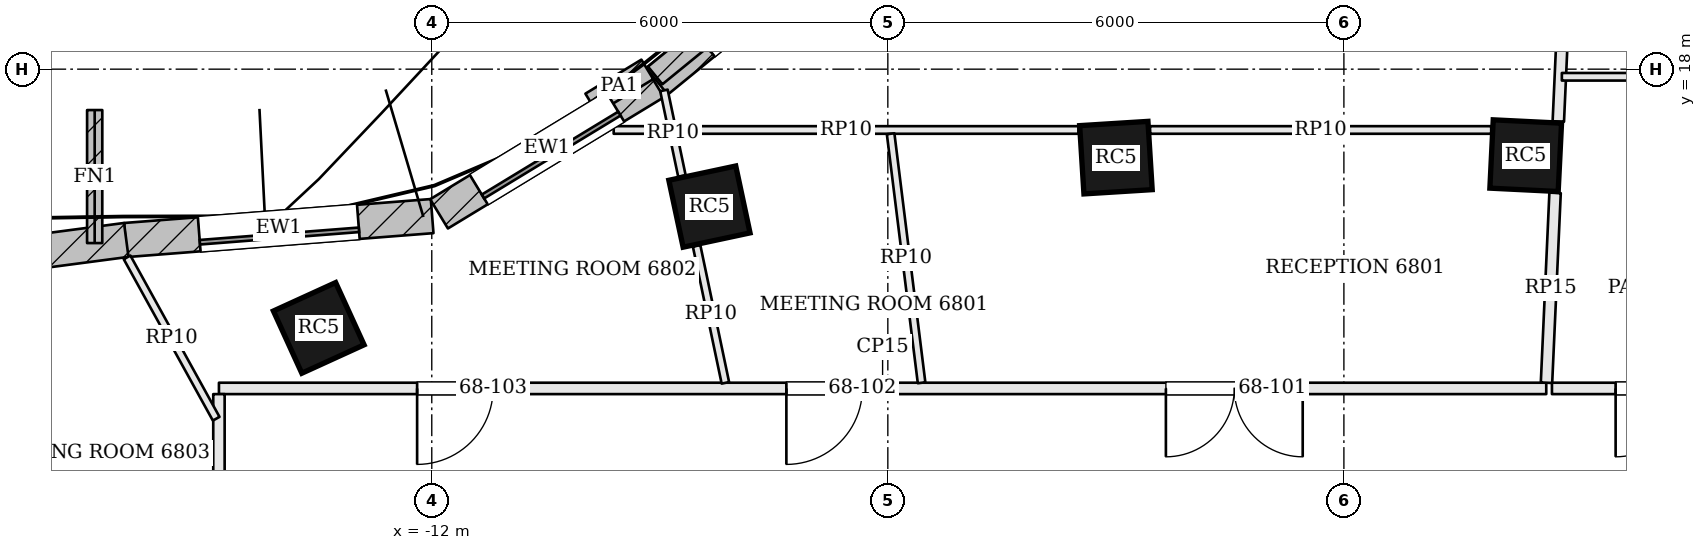
"""IFC4 building model, lengths in metres.
Left out: names, types, materials, properties, quantities, classifications, styles, units other than length and angle.
Written with IfcOpenShell. Run it as: python <this file> out.ifc"""

import sys

from ifc_helpers import new_model, si_unit, direction, frame, frame_2d, origin, origin_2d, place, context, subcontext, project, spatial, rectangle, extrude, element, fill, save


model = new_model("IFC4")
c1 = context("Model", 3, precision=1e-05, world=origin(), true_north=direction((0.0, 1.0)))
c2 = subcontext(c1, "Body", "Model", "MODEL_VIEW")
j1 = project(units=[si_unit("LENGTHUNIT", "METRE"), si_unit("PLANEANGLEUNIT", "RADIAN")], contexts=[c1])
p1 = place(None, origin())
s1 = spatial("IfcSite", under=j1, at=p1, CompositionType="ELEMENT")
p2 = place(p1, origin())
s2 = spatial("IfcBuilding", under=s1, at=p2, CompositionType="ELEMENT")
p3 = place(p2, frame((0.0, 0.0, 276.6)))
s3 = spatial("IfcBuildingStorey", under=s2, at=p3, CompositionType="ELEMENT", Elevation=276.6)
for number, where, z_axis, x_axis in (
    (1, (2.392, 16.862, 0.0), (0.0, 0.0, 1.0), (-0.999, 0.049, 0.0)),
    (2, (-2.999, 16.836, 0.0), (0.0, 0.0, 1.0), (-0.998, -0.062, 0.0)),
    (3, (-8.347, 16.192, 0.0), (0.0, 0.0, 1.0), (-0.978, -0.209, 0.0)),
    (4, (-13.487, 14.596, 0.0), (0.0, 0.0, 1.0), (-0.91, -0.415, 0.0)),
):
    element("IfcColumn", number, at=place(p3, frame(where, z_axis=z_axis, x_axis=x_axis)), inside=s3, PredefinedType="COLUMN", context=c2, shape_type="SweptSolid", body=[
        extrude(rectangle(XDim=0.9, YDim=0.9, at=origin_2d()), origin(), (0.0, 0.0, 1.0), 3.9),
    ])
p4 = place(p3, frame((6.177, 17.798, 0.0), z_axis=(0.0, 0.0, 1.0), x_axis=(-0.852939764965, 0.52200934603, 0.0)))
e5 = element("IfcWall", 5, at=p4, inside=s3, PredefinedType="SOLIDWALL", context=c2, shape_type="SweptSolid", body=[
    extrude(rectangle(XDim=4.113, YDim=0.45, at=frame_2d((2.056, 0.0))), origin(), (0.0, 0.0, 1.0), 3.7),
])
p5 = place(p4, frame((1.006, 0.0, 0.9)))
e6 = element("IfcOpeningElement", 6, at=p5, cuts=e5, PredefinedType="OPENING", context=c2, shape_type="SweptSolid", body=[
    extrude(rectangle(XDim=2.1, YDim=2.3, at=frame_2d((1.05, 1.15))), frame((0.0, 0.235, 0.0), z_axis=(0.0, -1.0, 0.0), x_axis=(1.0, 0.0, 0.0)), (0.0, 0.0, 1.0), 0.47),
])
p6 = place(p3, frame((-6.411, 19.983, 0.0), z_axis=(0.0, 0.0, 1.0), x_axis=(-0.774810240287, -0.632193871804, 0.0)))
e7 = element("IfcWall", 7, at=p6, inside=s3, PredefinedType="SOLIDWALL", context=c2, shape_type="SweptSolid", body=[
    extrude(rectangle(XDim=3.389, YDim=0.45, at=frame_2d((1.695, 0.0))), origin(), (0.0, 0.0, 1.0), 3.7),
])
p7 = place(p6, frame((0.795, 0.0, 0.9)))
e8 = element("IfcOpeningElement", 8, at=p7, cuts=e7, PredefinedType="OPENING", context=c2, shape_type="SweptSolid", body=[
    extrude(rectangle(XDim=1.8, YDim=2.3, at=frame_2d((0.9, 1.15))), frame((0.0, 0.235, 0.0), z_axis=(0.0, -1.0, 0.0), x_axis=(1.0, 0.0, 0.0)), (0.0, 0.0, 1.0), 0.47),
])
p8 = place(p3, frame((-9.063, 17.823, 0.0), z_axis=(0.0, 0.0, 1.0), x_axis=(-0.854622263029, -0.519250216693, 0.0)))
e9 = element("IfcWall", 9, at=p8, inside=s3, PredefinedType="SOLIDWALL", context=c2, shape_type="SweptSolid", body=[
    extrude(rectangle(XDim=3.325, YDim=0.45, at=frame_2d((1.662, 0.0))), origin(), (0.0, 0.0, 1.0), 3.7),
])
p9 = place(p8, frame((0.612, 0.0, 0.9)))
e10 = element("IfcOpeningElement", 10, at=p9, cuts=e9, PredefinedType="OPENING", context=c2, shape_type="SweptSolid", body=[
    extrude(rectangle(XDim=2.1, YDim=2.3, at=frame_2d((1.05, 1.15))), frame((0.0, 0.235, 0.0), z_axis=(0.0, -1.0, 0.0), x_axis=(1.0, 0.0, 0.0)), (0.0, 0.0, 1.0), 0.47),
])
p10 = place(p3, frame((-11.995, 16.067, 0.0), z_axis=(0.0, 0.0, 1.0), x_axis=(-0.996967993416, -0.077812724559, 0.0)))
e11 = element("IfcWall", 11, at=p10, inside=s3, PredefinedType="SOLIDWALL", context=c2, shape_type="SweptSolid", body=[
    extrude(rectangle(XDim=4.047, YDim=0.45, at=frame_2d((2.024, 0.0))), origin(), (0.0, 0.0, 1.0), 3.7),
])
p11 = place(p10, frame((0.974, 0.0, 0.9)))
e12 = element("IfcOpeningElement", 12, at=p11, cuts=e11, PredefinedType="OPENING", context=c2, shape_type="SweptSolid", body=[
    extrude(rectangle(XDim=2.1, YDim=2.3, at=frame_2d((1.05, 1.15))), frame((0.0, 0.235, 0.0), z_axis=(0.0, -1.0, 0.0), x_axis=(1.0, 0.0, 0.0)), (0.0, 0.0, 1.0), 0.47),
])
p12 = place(p3, frame((-16.019, 15.753, 0.0), z_axis=(0.0, 0.0, 1.0), x_axis=(-0.991409967396, -0.130790965086, 0.0)))
e13 = element("IfcWall", 13, at=p12, inside=s3, PredefinedType="SOLIDWALL", context=c2, shape_type="SweptSolid", body=[
    extrude(rectangle(XDim=5.068, YDim=0.45, at=frame_2d((2.534, 0.0))), origin(), (0.0, 0.0, 1.0), 3.7),
])
p13 = place(p12, frame((1.484, 0.0, 0.9)))
e14 = element("IfcOpeningElement", 14, at=p13, cuts=e13, PredefinedType="OPENING", context=c2, shape_type="SweptSolid", body=[
    extrude(rectangle(XDim=2.1, YDim=2.3, at=frame_2d((1.05, 1.15))), frame((0.0, 0.235, 0.0), z_axis=(0.0, -1.0, 0.0), x_axis=(1.0, 0.0, 0.0)), (0.0, 0.0, 1.0), 0.47),
])
p14 = place(p3, frame((-16.435, 15.712, 0.0), z_axis=(0.0, 0.0, 1.0), x_axis=(0.000279017846, 0.999999961075, 0.0)))
e15 = element("IfcWall", 15, at=p14, inside=s3, PredefinedType="SOLIDWALL", context=c2, shape_type="SweptSolid", body=[
    extrude(rectangle(XDim=1.75, YDim=0.2, at=frame_2d((0.875, 0.0))), origin(), (0.0, 0.0, 1.0), 3.7),
])
p15 = place(p3, frame((-6.505, 20.003, 3.9), z_axis=(0.0, 0.0, 1.0), x_axis=(-0.774774389425, -0.632237807705, 0.0)))
e16 = element("IfcWall", 16, at=p15, inside=s3, PredefinedType="PARAPET", context=c2, shape_type="SweptSolid", body=[
    extrude(rectangle(XDim=3.299, YDim=0.3, at=frame_2d((1.649, 0.0))), origin(), (0.0, 0.0, 1.0), 1.1),
])
p16 = place(p3, frame((-9.164, 17.997, 3.9), z_axis=(0.0, 0.0, 1.0), x_axis=(-0.854630396294, -0.519236830098, 0.0)))
e17 = element("IfcWall", 17, at=p16, inside=s3, PredefinedType="PARAPET", context=c2, shape_type="SweptSolid", body=[
    extrude(rectangle(XDim=0.862, YDim=0.3, at=frame_2d((0.431, 0.0))), origin(), (0.0, 0.0, 1.0), 1.1),
])
p17 = place(p3, frame((2.662, 13.8, 0.0), z_axis=(0.0, 0.0, 1.0), x_axis=(-1.0, 0.0, 0.0)))
e18 = element("IfcWall", 18, at=p17, inside=s3, PredefinedType="PARTITIONING", context=c2, shape_type="SweptSolid", body=[
    extrude(rectangle(XDim=17.462, YDim=0.15, at=frame_2d((8.731, 0.0))), origin(), (0.0, 0.0, 1.0), 3.198),
])
p18 = place(p17, frame((3.204, 0.0, 0.0)))
e19 = element("IfcOpeningElement", 19, at=p18, cuts=e18, PredefinedType="OPENING", context=c2, shape_type="SweptSolid", body=[
    extrude(rectangle(XDim=1.8, YDim=2.1, at=frame_2d((0.9, 1.05))), frame((0.0, 0.085, 0.0), z_axis=(0.0, -1.0, 0.0), x_axis=(1.0, 0.0, 0.0)), (0.0, 0.0, 1.0), 0.17),
])
p19 = place(p17, frame((8.997, 0.0, 0.0)))
e20 = element("IfcOpeningElement", 20, at=p19, cuts=e18, PredefinedType="OPENING", context=c2, shape_type="SweptSolid", body=[
    extrude(rectangle(XDim=1.0, YDim=2.4, at=frame_2d((0.5, 1.2))), frame((0.0, 0.085, 0.0), z_axis=(0.0, -1.0, 0.0), x_axis=(1.0, 0.0, 0.0)), (0.0, 0.0, 1.0), 0.17),
])
p20 = place(p17, frame((13.855, 0.0, 0.0)))
e21 = element("IfcOpeningElement", 21, at=p20, cuts=e18, PredefinedType="OPENING", context=c2, shape_type="SweptSolid", body=[
    extrude(rectangle(XDim=1.0, YDim=2.4, at=frame_2d((0.5, 1.2))), frame((0.0, 0.085, 0.0), z_axis=(0.0, -1.0, 0.0), x_axis=(1.0, 0.0, 0.0)), (0.0, 0.0, 1.0), 0.17),
])
p21 = place(p3, frame((-14.8, 13.725, 0.0), z_axis=(0.0, 0.0, 1.0), x_axis=(0.0, -1.0, 0.0)))
e22 = element("IfcWall", 22, at=p21, inside=s3, PredefinedType="PARTITIONING", context=c2, shape_type="SweptSolid", body=[
    extrude(rectangle(XDim=17.5, YDim=0.15, at=frame_2d((8.75, 0.0))), origin(), (0.0, 0.0, 1.0), 3.198),
])
p22 = place(p21, frame((2.536, 0.0, 0.0)))
e23 = element("IfcOpeningElement", 23, at=p22, cuts=e22, PredefinedType="OPENING", context=c2, shape_type="SweptSolid", body=[
    extrude(rectangle(XDim=1.0, YDim=2.4, at=frame_2d((0.5, 1.2))), frame((0.0, 0.085, 0.0), z_axis=(0.0, -1.0, 0.0), x_axis=(1.0, 0.0, 0.0)), (0.0, 0.0, 1.0), 0.17),
])
p23 = place(p21, frame((6.442, 0.0, 0.0)))
e24 = element("IfcOpeningElement", 24, at=p23, cuts=e22, PredefinedType="OPENING", context=c2, shape_type="SweptSolid", body=[
    extrude(rectangle(XDim=1.0, YDim=2.4, at=frame_2d((0.5, 1.2))), frame((0.0, 0.085, 0.0), z_axis=(0.0, -1.0, 0.0), x_axis=(1.0, 0.0, 0.0)), (0.0, 0.0, 1.0), 0.17),
])
p24 = place(p21, frame((10.45, 0.0, 0.0)))
e25 = element("IfcOpeningElement", 25, at=p24, cuts=e22, PredefinedType="OPENING", context=c2, shape_type="SweptSolid", body=[
    extrude(rectangle(XDim=1.0, YDim=2.1, at=frame_2d((0.5, 1.05))), frame((0.0, 0.085, 0.0), z_axis=(0.0, -1.0, 0.0), x_axis=(1.0, 0.0, 0.0)), (0.0, 0.0, 1.0), 0.17),
])
p25 = place(p21, frame((15.05, 0.0, 0.0)))
e26 = element("IfcOpeningElement", 26, at=p25, cuts=e22, PredefinedType="OPENING", context=c2, shape_type="SweptSolid", body=[
    extrude(rectangle(XDim=1.0, YDim=2.1, at=frame_2d((0.5, 1.05))), frame((0.0, 0.085, 0.0), z_axis=(0.0, -1.0, 0.0), x_axis=(1.0, 0.0, 0.0)), (0.0, 0.0, 1.0), 0.17),
])
p26 = place(p3, frame((2.921, 19.522, 0.0), z_axis=(0.0, 0.0, 1.0), x_axis=(-0.045122409645, -0.998981465368, 0.0)))
e27 = element("IfcWall", 27, at=p26, inside=s3, PredefinedType="PARTITIONING", context=c2, shape_type="SweptSolid", body=[
    extrude(rectangle(XDim=2.213, YDim=0.15, at=frame_2d((1.106, 0.0))), origin(), (0.0, 0.0, 1.0), 3.184),
])
p27 = place(p3, frame((2.779, 16.372, 0.0), z_axis=(0.0, 0.0, 1.0), x_axis=(-0.045217170266, -0.998977180677, 0.0)))
e28 = element("IfcWall", 28, at=p27, inside=s3, PredefinedType="PARTITIONING", context=c2, shape_type="SweptSolid", body=[
    extrude(rectangle(XDim=2.5, YDim=0.15, at=frame_2d((1.25, 0.0))), origin(), (0.0, 0.0, 1.0), 3.184),
])
p28 = place(p3, frame((14.725, 13.8, 0.0), z_axis=(0.0, 0.0, 1.0), x_axis=(-1.0, 0.0, 0.0)))
e29 = element("IfcWall", 29, at=p28, inside=s3, PredefinedType="PARTITIONING", context=c2, shape_type="SweptSolid", body=[
    extrude(rectangle(XDim=11.988, YDim=0.15, at=frame_2d((5.994, 0.0))), origin(), (0.0, 0.0, 1.0), 3.198),
])
p29 = place(p28, frame((3.2, 0.0, 0.0)))
e30 = element("IfcOpeningElement", 30, at=p29, cuts=e29, PredefinedType="OPENING", context=c2, shape_type="SweptSolid", body=[
    extrude(rectangle(XDim=1.8, YDim=2.1, at=frame_2d((0.9, 1.05))), frame((0.0, 0.085, 0.0), z_axis=(0.0, -1.0, 0.0), x_axis=(1.0, 0.0, 0.0)), (0.0, 0.0, 1.0), 0.17),
])
p30 = place(p28, frame((5.757, 0.0, 0.0)))
e31 = element("IfcOpeningElement", 31, at=p30, cuts=e29, PredefinedType="OPENING", context=c2, shape_type="SweptSolid", body=[
    extrude(rectangle(XDim=1.0, YDim=2.4, at=frame_2d((0.5, 1.2))), frame((0.0, 0.085, 0.0), z_axis=(0.0, -1.0, 0.0), x_axis=(1.0, 0.0, 0.0)), (0.0, 0.0, 1.0), 0.17),
])
p31 = place(p28, frame((10.25, 0.0, 0.0)))
e32 = element("IfcOpeningElement", 32, at=p31, cuts=e29, PredefinedType="OPENING", context=c2, shape_type="SweptSolid", body=[
    extrude(rectangle(XDim=0.9, YDim=2.1, at=frame_2d((0.45, 1.05))), frame((0.0, 0.085, 0.0), z_axis=(0.0, -1.0, 0.0), x_axis=(1.0, 0.0, 0.0)), (0.0, 0.0, 1.0), 0.17),
])
p32 = place(p3, frame((-9.607, 17.2, 0.0), z_axis=(0.0, 0.0, 1.0), x_axis=(1.0, 0.0, 0.0)))
e33 = element("IfcWall", 33, at=p32, inside=s3, PredefinedType="PARTITIONING", context=c2, shape_type="SweptSolid", body=[
    extrude(rectangle(XDim=6.114, YDim=0.1, at=frame_2d((3.057, 0.0))), origin(), (0.0, 0.0, 1.0), 3.184),
])
p33 = place(p3, frame((-2.551, 17.2, 0.0), z_axis=(0.0, 0.0, 1.0), x_axis=(1.0, 0.0, 0.0)))
e34 = element("IfcWall", 34, at=p33, inside=s3, PredefinedType="PARTITIONING", context=c2, shape_type="SweptSolid", body=[
    extrude(rectangle(XDim=4.489, YDim=0.1, at=frame_2d((2.244, 0.0))), origin(), (0.0, 0.0, 1.0), 3.184),
])
p34 = place(p3, frame((-5.556, 13.875, 0.0), z_axis=(0.0, 0.0, 1.0), x_axis=(-0.123361123782, 0.99236184587, 0.0)))
e35 = element("IfcWall", 35, at=p34, inside=s3, PredefinedType="PARTITIONING", context=c2, shape_type="SweptSolid", body=[
    extrude(rectangle(XDim=3.301, YDim=0.1, at=frame_2d((1.65, 0.0))), origin(), (0.0, 0.0, 1.0), 3.184),
])
p35 = place(p3, frame((-8.137, 13.873, 0.0), z_axis=(0.0, 0.0, 1.0), x_axis=(-0.20551596438, 0.978653763282, 0.0)))
e36 = element("IfcWall", 36, at=p35, inside=s3, PredefinedType="PARTITIONING", context=c2, shape_type="SweptSolid", body=[
    extrude(rectangle(XDim=1.841, YDim=0.1, at=frame_2d((0.921, 0.0))), origin(), (0.0, 0.0, 1.0), 3.184),
])
p36 = place(p3, frame((-8.709, 16.595, 0.0), z_axis=(0.0, 0.0, 1.0), x_axis=(-0.205700213962, 0.978615053009, 0.0)))
e37 = element("IfcWall", 37, at=p36, inside=s3, PredefinedType="PARTITIONING", context=c2, shape_type="SweptSolid", body=[
    extrude(rectangle(XDim=1.15, YDim=0.1, at=frame_2d((0.575, 0.0))), origin(), (0.0, 0.0, 1.0), 3.184),
])
p37 = place(p3, frame((-14.836, 13.401, 0.0), z_axis=(0.0, 0.0, 1.0), x_axis=(-0.483487187132, 0.875351437926, 0.0)))
e38 = element("IfcWall", 38, at=p37, inside=s3, PredefinedType="PARTITIONING", context=c2, shape_type="SweptSolid", body=[
    extrude(rectangle(XDim=2.425, YDim=0.1, at=frame_2d((1.212, 0.0))), origin(), (0.0, 0.0, 1.0), 3.184),
])
p38 = place(p3, frame((2.868, 17.9, 0.0), z_axis=(0.0, 0.0, 1.0), x_axis=(1.0, 0.0, 0.0)))
e39 = element("IfcWall", 39, at=p38, inside=s3, PredefinedType="PARTITIONING", context=c2, shape_type="SweptSolid", body=[
    extrude(rectangle(XDim=2.704, YDim=0.1, at=frame_2d((1.352, 0.0))), origin(), (0.0, 0.0, 1.0), 3.184),
])
p39 = place(p38, frame((1.109, 0.0, 0.0)))
e40 = element("IfcOpeningElement", 40, at=p39, cuts=e39, PredefinedType="OPENING", context=c2, shape_type="SweptSolid", body=[
    extrude(rectangle(XDim=0.7, YDim=2.1, at=frame_2d((0.35, 1.05))), frame((0.0, 0.06, 0.0), z_axis=(0.0, -1.0, 0.0), x_axis=(1.0, 0.0, 0.0)), (0.0, 0.0, 1.0), 0.12),
])
p40 = place(p5, origin())
e41 = element("IfcWindow", 41, at=p40, inside=s3, PartitioningType="SINGLE_PANEL", PredefinedType="WINDOW", context=c2, shape_type="SweptSolid", body=[
    extrude(rectangle(XDim=2.1, YDim=2.3, at=frame_2d((1.05, 1.15))), frame((0.0, 0.135, 0.0), z_axis=(0.0, -1.0, 0.0), x_axis=(1.0, 0.0, 0.0)), (0.0, 0.0, 1.0), 0.06),
])
fill(e6, e41)
p41 = place(p9, origin())
e42 = element("IfcWindow", 42, at=p41, inside=s3, PartitioningType="SINGLE_PANEL", PredefinedType="WINDOW", context=c2, shape_type="SweptSolid", body=[
    extrude(rectangle(XDim=2.1, YDim=2.3, at=frame_2d((1.05, 1.15))), frame((0.0, 0.135, 0.0), z_axis=(0.0, -1.0, 0.0), x_axis=(1.0, 0.0, 0.0)), (0.0, 0.0, 1.0), 0.06),
])
fill(e10, e42)
p42 = place(p11, origin())
e43 = element("IfcWindow", 43, at=p42, inside=s3, PartitioningType="SINGLE_PANEL", PredefinedType="WINDOW", context=c2, shape_type="SweptSolid", body=[
    extrude(rectangle(XDim=2.1, YDim=2.3, at=frame_2d((1.05, 1.15))), frame((0.0, 0.135, 0.0), z_axis=(0.0, -1.0, 0.0), x_axis=(1.0, 0.0, 0.0)), (0.0, 0.0, 1.0), 0.06),
])
fill(e12, e43)
p43 = place(p18, origin())
e44 = element("IfcDoor", 44, at=p43, inside=s3, OperationType="DOUBLE_DOOR_SINGLE_SWING", PredefinedType="DOOR", context=c2, shape_type="SweptSolid", body=[
    extrude(rectangle(XDim=1.8, YDim=2.1, at=frame_2d((0.9, 1.05))), frame((0.0, 0.025, 0.0), z_axis=(0.0, -1.0, 0.0), x_axis=(1.0, 0.0, 0.0)), (0.0, 0.0, 1.0), 0.05),
])
fill(e19, e44)
p44 = place(p19, origin())
e45 = element("IfcDoor", 45, at=p44, inside=s3, OperationType="SINGLE_SWING_RIGHT", PredefinedType="DOOR", context=c2, shape_type="SweptSolid", body=[
    extrude(rectangle(XDim=1.0, YDim=2.4, at=frame_2d((0.5, 1.2))), frame((0.0, 0.025, 0.0), z_axis=(0.0, -1.0, 0.0), x_axis=(1.0, 0.0, 0.0)), (0.0, 0.0, 1.0), 0.05),
])
fill(e20, e45)
p45 = place(p20, origin())
e46 = element("IfcDoor", 46, at=p45, inside=s3, OperationType="SINGLE_SWING_RIGHT", PredefinedType="DOOR", context=c2, shape_type="SweptSolid", body=[
    extrude(rectangle(XDim=1.0, YDim=2.4, at=frame_2d((0.5, 1.2))), frame((0.0, 0.025, 0.0), z_axis=(0.0, -1.0, 0.0), x_axis=(1.0, 0.0, 0.0)), (0.0, 0.0, 1.0), 0.05),
])
fill(e21, e46)
p46 = place(p31, origin())
e47 = element("IfcDoor", 47, at=p46, inside=s3, OperationType="SINGLE_SWING_RIGHT", PredefinedType="DOOR", context=c2, shape_type="SweptSolid", body=[
    extrude(rectangle(XDim=0.9, YDim=2.1, at=frame_2d((0.45, 1.05))), frame((0.0, 0.025, 0.0), z_axis=(0.0, -1.0, 0.0), x_axis=(1.0, 0.0, 0.0)), (0.0, 0.0, 1.0), 0.05),
])
fill(e32, e47)
save(model, sys.argv[1])
